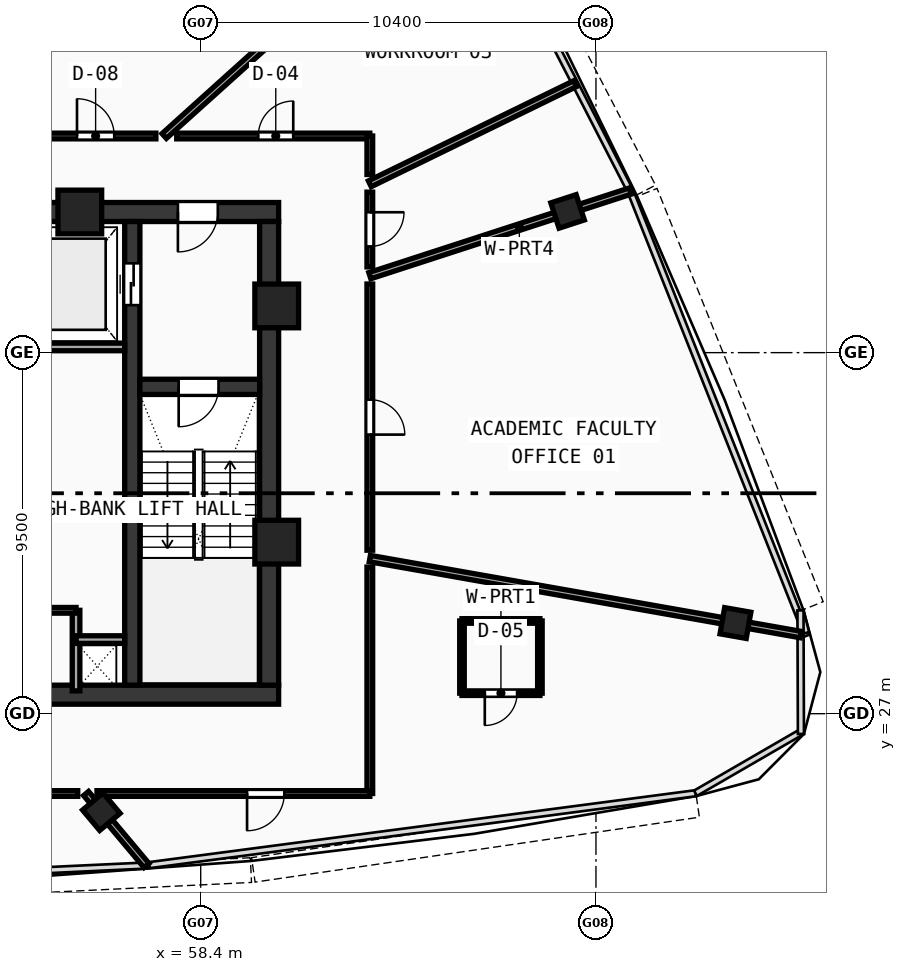
"""IFC4 building model, lengths in metres.
Left out: names, types, materials, properties, quantities, classifications, styles, units other than length and angle.
Written with IfcOpenShell. Run it as: python <this file> out.ifc"""

import sys

from ifc_helpers import new_model, si_unit, direction, frame, frame_2d, origin, origin_with_axes, origin_2d, place, context, subcontext, project, spatial, rectangle, hollow_rectangle, extrude, source, transform, mapped, element, fill, save


model = new_model("IFC4")
c1 = context("Model", 3, precision=1e-05, world=origin(), true_north=direction((0.0, 1.0)))
c2 = subcontext(c1, "Body", "Model", "MODEL_VIEW")
j1 = project(units=[si_unit("LENGTHUNIT", "METRE"), si_unit("PLANEANGLEUNIT", "RADIAN")], contexts=[c1])
p1 = place(None, origin())
s1 = spatial("IfcSite", under=j1, at=p1, CompositionType="ELEMENT")
p2 = place(p1, origin())
s2 = spatial("IfcBuilding", under=s1, at=p2, CompositionType="ELEMENT")
p3 = place(p2, frame((0.0, 0.0, 359.26)))
s3 = spatial("IfcBuildingStorey", under=s2, at=p3, CompositionType="ELEMENT", Elevation=359.26)
p4 = place(p3, frame((35.55, 27.5, 0.0), z_axis=(0.0, 0.0, 1.0), x_axis=(1.0, 0.0, 0.0)))
e1 = element("IfcWall", 1, at=p4, inside=s3, PredefinedType="SHEAR", context=c2, shape_type="SweptSolid", body=[
    extrude(rectangle(XDim=24.9, YDim=0.5, at=frame_2d((12.45, 0.0))), origin(), (0.0, 0.0, 1.0), 3.49),
])
p5 = place(p3, frame((49.2, 40.2, 0.0), z_axis=(0.0, 0.0, 1.0), x_axis=(1.0, 0.0, 0.0)))
e2 = element("IfcWall", 2, at=p5, inside=s3, PredefinedType="SHEAR", context=c2, shape_type="SweptSolid", body=[
    extrude(rectangle(XDim=11.25, YDim=0.5, at=frame_2d((5.625, 0.0))), origin(), (0.0, 0.0, 1.0), 3.49),
])
p6 = place(p5, frame((8.6, 0.0, 0.0)))
e3 = element("IfcOpeningElement", 3, at=p6, cuts=e2, PredefinedType="OPENING", context=c2, shape_type="SweptSolid", body=[
    extrude(rectangle(XDim=1.05, YDim=2.1, at=frame_2d((0.525, 1.05))), frame((0.0, 0.26, 0.0), z_axis=(0.0, -1.0, 0.0), x_axis=(1.0, 0.0, 0.0)), (0.0, 0.0, 1.0), 0.52),
])
p7 = place(p3, frame((60.2, 27.75, 0.0), z_axis=(0.0, 0.0, 1.0), x_axis=(0.0, 1.0, 0.0)))
e4 = element("IfcWall", 4, at=p7, inside=s3, PredefinedType="SHEAR", context=c2, shape_type="SweptSolid", body=[
    extrude(rectangle(XDim=12.2, YDim=0.5, at=frame_2d((6.1, 0.0))), origin(), (0.0, 0.0, 1.0), 3.49),
])
p8 = place(p3, frame((56.6, 27.75, 0.0), z_axis=(0.0, 0.0, 1.0), x_axis=(0.0, 1.0, 0.0)))
e5 = element("IfcWall", 5, at=p8, inside=s3, PredefinedType="SHEAR", context=c2, shape_type="SweptSolid", body=[
    extrude(rectangle(XDim=12.2, YDim=0.4, at=frame_2d((6.1, 0.0))), origin(), (0.0, 0.0, 1.0), 3.49),
])
p9 = place(p8, frame((10.0, 0.0, 0.0)))
e6 = element("IfcOpeningElement", 6, at=p9, cuts=e5, PredefinedType="OPENING", context=c2, shape_type="SweptSolid", body=[
    extrude(rectangle(XDim=1.1, YDim=2.1, at=frame_2d((0.55, 1.05))), frame((0.0, 0.21, 0.0), z_axis=(0.0, -1.0, 0.0), x_axis=(1.0, 0.0, 0.0)), (0.0, 0.0, 1.0), 0.42),
])
p10 = place(p3, frame((56.8, 35.6, 0.0), z_axis=(0.0, 0.0, 1.0), x_axis=(1.0, 0.0, 0.0)))
e7 = element("IfcWall", 7, at=p10, inside=s3, PredefinedType="SHEAR", context=c2, shape_type="SweptSolid", body=[
    extrude(rectangle(XDim=3.15, YDim=0.4, at=frame_2d((1.575, 0.0))), origin(), (0.0, 0.0, 1.0), 3.49),
])
p11 = place(p10, frame((1.02, 0.0, 0.0)))
e8 = element("IfcOpeningElement", 8, at=p11, cuts=e7, PredefinedType="OPENING", context=c2, shape_type="SweptSolid", body=[
    extrude(rectangle(XDim=1.05, YDim=2.1, at=frame_2d((0.525, 1.05))), frame((0.0, 0.21, 0.0), z_axis=(0.0, -1.0, 0.0), x_axis=(1.0, 0.0, 0.0)), (0.0, 0.0, 1.0), 0.42),
])
m1 = source(origin(), c2, "Body", "SweptSolid", [
    extrude(hollow_rectangle(XDim=1.15, YDim=1.15, WallThickness=0.048, at=origin_2d()), origin(), (0.0, 0.0, 1.0), 3.75),
])
for number, where, z_axis, x_axis in (
    (9, (60.4, 31.513, -0.26), (0.0, 0.0, 1.0), (1.0, 0.0, 0.0)),
    (10, (60.4, 37.729, -0.26), (0.0, 0.0, 1.0), (1.0, 0.0, 0.0)),
    (11, (55.219, 40.2, -0.26), (0.0, 0.0, 1.0), (1.0, 0.0, 0.0)),
):
    element("IfcColumn", number, at=place(p3, frame(where, z_axis=z_axis, x_axis=x_axis)), inside=s3, PredefinedType="COLUMN", context=c2, shape_type="MappedRepresentation", body=[
        mapped(m1, transform((0.0, 0.0, 0.0), scale=1.0)),
    ])
m2 = source(origin(), c2, "Body", "SweptSolid", [
    extrude(hollow_rectangle(XDim=0.7, YDim=0.7, WallThickness=0.026, at=origin_2d()), origin(), (0.0, 0.0, 1.0), 3.75),
])
for number, where, z_axis, x_axis in (
    (12, (55.785, 24.422, -0.26), (0.0, 0.0, 1.0), (0.766, 0.643, 0.0)),
    (13, (72.47, 29.385, -0.26), (0.0, 0.0, 1.0), (0.174, 0.985, 0.0)),
    (14, (68.053, 40.216, -0.26), (0.0, 0.0, 1.0), (-0.309, 0.951, 0.0)),
):
    element("IfcColumn", number, at=place(p3, frame(where, z_axis=z_axis, x_axis=x_axis)), inside=s3, PredefinedType="COLUMN", context=c2, shape_type="MappedRepresentation", body=[
        mapped(m2, transform((0.0, 0.0, 0.0), scale=1.0)),
    ])
p12 = place(p3, frame((53.68, 36.65, 0.0), z_axis=(0.0, 0.0, 1.0), x_axis=(1.0, 0.0, 0.0)))
e15 = element("IfcWall", 15, at=p12, inside=s3, PredefinedType="SOLIDWALL", context=c2, shape_type="SweptSolid", body=[
    extrude(rectangle(XDim=2.72, YDim=0.2, at=frame_2d((1.36, 0.0))), origin(), (0.0, 0.0, 1.0), 3.49),
])
p13 = place(p3, frame((55.12, 27.6, 0.0), z_axis=(0.0, 0.0, 1.0), x_axis=(0.0, 1.0, 0.0)))
e16 = element("IfcWall", 16, at=p13, inside=s3, PredefinedType="SOLIDWALL", context=c2, shape_type="SweptSolid", body=[
    extrude(rectangle(XDim=2.12, YDim=0.2, at=frame_2d((1.06, 0.0))), origin(), (0.0, 0.0, 1.0), 3.49),
])
p14 = place(p3, frame((55.12, 28.95, 0.0), z_axis=(0.0, 0.0, 1.0), x_axis=(1.0, 0.0, 0.0)))
e17 = element("IfcWall", 17, at=p14, inside=s3, PredefinedType="SOLIDWALL", context=c2, shape_type="SweptSolid", body=[
    extrude(rectangle(XDim=1.28, YDim=0.2, at=frame_2d((0.64, 0.0))), origin(), (0.0, 0.0, 1.0), 3.49),
])
p15 = place(p3, frame((51.05, 29.72, 0.0), z_axis=(0.0, 0.0, 1.0), x_axis=(1.0, 0.0, 0.0)))
e18 = element("IfcWall", 18, at=p15, inside=s3, PredefinedType="PARTITIONING", context=c2, shape_type="SweptSolid", body=[
    extrude(rectangle(XDim=4.07, YDim=0.15, at=frame_2d((2.035, 0.0))), origin(), (0.0, 0.0, 1.0), 3.49),
])
p16 = place(p15, frame((0.5, 0.0, 0.0)))
e19 = element("IfcOpeningElement", 19, at=p16, cuts=e18, PredefinedType="OPENING", context=c2, shape_type="SweptSolid", body=[
    extrude(rectangle(XDim=0.9, YDim=2.1, at=frame_2d((0.45, 1.05))), frame((0.0, 0.085, 0.0), z_axis=(0.0, -1.0, 0.0), x_axis=(1.0, 0.0, 0.0)), (0.0, 0.0, 1.0), 0.17),
])
p17 = place(p3, frame((62.85, 38.525, 0.0), z_axis=(0.0, 0.0, 1.0), x_axis=(0.951060950279, 0.309003347644, 0.0)))
e20 = element("IfcWall", 20, at=p17, inside=s3, PredefinedType="PARTITIONING", context=c2, shape_type="SweptSolid", body=[
    extrude(rectangle(XDim=7.207, YDim=0.17, at=frame_2d((3.604, 0.0))), origin(), (0.0, 0.0, 1.0), 2.89),
])
p18 = place(p3, frame((62.85, 40.943, 0.0), z_axis=(0.0, 0.0, 1.0), x_axis=(0.898803189206, 0.438352400557, 0.0)))
e21 = element("IfcWall", 21, at=p18, inside=s3, PredefinedType="PARTITIONING", context=c2, shape_type="SweptSolid", body=[
    extrude(rectangle(XDim=6.01, YDim=0.17, at=frame_2d((3.005, 0.0))), origin(), (0.0, 0.0, 1.0), 2.89),
])
p19 = place(p3, frame((57.44, 42.2, 0.0), z_axis=(0.0, 0.0, 1.0), x_axis=(0.743152066897, 0.66912256386, 0.0)))
e22 = element("IfcWall", 22, at=p19, inside=s3, PredefinedType="PARTITIONING", context=c2, shape_type="SweptSolid", body=[
    extrude(rectangle(XDim=10.596, YDim=0.17, at=frame_2d((5.298, 0.0))), origin(), (0.0, 0.0, 1.0), 2.89),
])
p20 = place(p3, frame((55.384, 24.9, 0.0), z_axis=(0.0, 0.0, 1.0), x_axis=(0.642821604445, -0.766015916844, 0.0)))
e23 = element("IfcWall", 23, at=p20, inside=s3, PredefinedType="PARTITIONING", context=c2, shape_type="SweptSolid", body=[
    extrude(rectangle(XDim=2.473, YDim=0.17, at=frame_2d((1.237, 0.0))), origin(), (0.0, 0.0, 1.0), 2.89),
])
p21 = place(p3, frame((62.85, 31.082, 0.0), z_axis=(0.0, 0.0, 1.0), x_axis=(0.984809380036, -0.173638950101, 0.0)))
e24 = element("IfcWall", 24, at=p21, inside=s3, PredefinedType="PARTITIONING", context=c2, shape_type="SweptSolid", body=[
    extrude(rectangle(XDim=11.512, YDim=0.17, at=frame_2d((5.756, 0.0))), origin(), (0.0, 0.0, 1.0), 2.89),
])
p22 = place(p3, frame((54.02, 42.2, 0.0), z_axis=(0.0, 0.0, 1.0), x_axis=(1.0, 0.0, 0.0)))
e25 = element("IfcWall", 25, at=p22, inside=s3, PredefinedType="PARTITIONING", context=c2, shape_type="SweptSolid", body=[
    extrude(rectangle(XDim=3.2, YDim=0.15, at=frame_2d((1.6, 0.0))), origin(), (0.0, 0.0, 1.0), 2.89),
])
p23 = place(p22, frame((1.125, 0.0, 0.0)))
e26 = element("IfcOpeningElement", 26, at=p23, cuts=e25, PredefinedType="OPENING", context=c2, shape_type="SweptSolid", body=[
    extrude(rectangle(XDim=0.98, YDim=2.12, at=frame_2d((0.49, 1.06))), frame((0.0, 0.085, 0.0), z_axis=(0.0, -1.0, 0.0), x_axis=(1.0, 0.0, 0.0)), (0.0, 0.0, 1.0), 0.17),
])
p24 = place(p3, frame((57.769, 42.2, 0.0), z_axis=(0.0, 0.0, 1.0), x_axis=(1.0, 0.0, 0.0)))
e27 = element("IfcWall", 27, at=p24, inside=s3, PredefinedType="PARTITIONING", context=c2, shape_type="SweptSolid", body=[
    extrude(rectangle(XDim=5.081, YDim=0.15, at=frame_2d((2.541, 0.0))), origin(), (0.0, 0.0, 1.0), 3.14),
])
p25 = place(p24, frame((2.146, 0.0, 0.0)))
e28 = element("IfcOpeningElement", 28, at=p25, cuts=e27, PredefinedType="OPENING", context=c2, shape_type="SweptSolid", body=[
    extrude(rectangle(XDim=0.92, YDim=2.1, at=frame_2d((0.46, 1.05))), frame((0.0, 0.085, 0.0), z_axis=(0.0, -1.0, 0.0), x_axis=(1.0, 0.0, 0.0)), (0.0, 0.0, 1.0), 0.17),
])
p26 = place(p3, frame((62.85, 42.2, 0.0), z_axis=(0.0, 0.0, 1.0), x_axis=(0.0, -1.0, 0.0)))
e29 = element("IfcWall", 29, at=p26, inside=s3, PredefinedType="PARTITIONING", context=c2, shape_type="SweptSolid", body=[
    extrude(rectangle(XDim=1.012, YDim=0.15, at=frame_2d((0.506, 0.0))), origin(), (0.0, 0.0, 1.0), 3.49),
])
p27 = place(p3, frame((62.85, 40.723, 0.0), z_axis=(0.0, 0.0, 1.0), x_axis=(0.0, -1.0, 0.0)))
e30 = element("IfcWall", 30, at=p27, inside=s3, PredefinedType="PARTITIONING", context=c2, shape_type="SweptSolid", body=[
    extrude(rectangle(XDim=1.967, YDim=0.15, at=frame_2d((0.983, 0.0))), origin(), (0.0, 0.0, 1.0), 3.14),
])
p28 = place(p27, frame((0.529, 0.0, 0.0)))
e31 = element("IfcOpeningElement", 31, at=p28, cuts=e30, PredefinedType="OPENING", context=c2, shape_type="SweptSolid", body=[
    extrude(rectangle(XDim=0.9, YDim=2.08, at=frame_2d((0.45, 1.04))), frame((0.0, 0.085, 0.0), z_axis=(0.0, -1.0, 0.0), x_axis=(1.0, 0.0, 0.0)), (0.0, 0.0, 1.0), 0.17),
])
p29 = place(p3, frame((62.85, 38.305, 0.0), z_axis=(0.0, 0.0, 1.0), x_axis=(0.0, -1.0, 0.0)))
e32 = element("IfcWall", 32, at=p29, inside=s3, PredefinedType="PARTITIONING", context=c2, shape_type="SweptSolid", body=[
    extrude(rectangle(XDim=7.004, YDim=0.15, at=frame_2d((3.502, 0.0))), origin(), (0.0, 0.0, 1.0), 3.49),
])
p30 = place(p29, frame((3.042, 0.0, 0.0)))
e33 = element("IfcOpeningElement", 33, at=p30, cuts=e32, PredefinedType="OPENING", context=c2, shape_type="SweptSolid", body=[
    extrude(rectangle(XDim=0.92, YDim=2.1, at=frame_2d((0.46, 1.05))), frame((0.0, 0.085, 0.0), z_axis=(0.0, -1.0, 0.0), x_axis=(1.0, 0.0, 0.0)), (0.0, 0.0, 1.0), 0.17),
])
p31 = place(p3, frame((62.85, 30.858, 0.0), z_axis=(0.0, 0.0, 1.0), x_axis=(0.0, -1.0, 0.0)))
e34 = element("IfcWall", 34, at=p31, inside=s3, PredefinedType="PARTITIONING", context=c2, shape_type="SweptSolid", body=[
    extrude(rectangle(XDim=5.958, YDim=0.15, at=frame_2d((2.979, 0.0))), origin(), (0.0, 0.0, 1.0), 2.89),
])
p32 = place(p3, frame((62.85, 24.9, 0.0), z_axis=(0.0, 0.0, 1.0), x_axis=(-1.0, 0.0, 0.0)))
e35 = element("IfcWall", 35, at=p32, inside=s3, PredefinedType="PARTITIONING", context=c2, shape_type="SweptSolid", body=[
    extrude(rectangle(XDim=7.179, YDim=0.15, at=frame_2d((3.589, 0.0))), origin(), (0.0, 0.0, 1.0), 2.89),
])
p33 = place(p32, frame((2.25, 0.0, 0.0)))
e36 = element("IfcOpeningElement", 36, at=p33, cuts=e35, PredefinedType="OPENING", context=c2, shape_type="SweptSolid", body=[
    extrude(rectangle(XDim=0.98, YDim=2.12, at=frame_2d((0.49, 1.06))), frame((0.0, 0.085, 0.0), z_axis=(0.0, -1.0, 0.0), x_axis=(1.0, 0.0, 0.0)), (0.0, 0.0, 1.0), 0.17),
])
p34 = place(p3, frame((55.164, 24.9, 0.0), z_axis=(0.0, 0.0, 1.0), x_axis=(-1.0, 0.0, 0.0)))
e37 = element("IfcWall", 37, at=p34, inside=s3, PredefinedType="PARTITIONING", context=c2, shape_type="SweptSolid", body=[
    extrude(rectangle(XDim=4.579, YDim=0.15, at=frame_2d((2.289, 0.0))), origin(), (0.0, 0.0, 1.0), 3.49),
])
p35 = place(p34, frame((1.55, 0.0, 0.0)))
e38 = element("IfcOpeningElement", 38, at=p35, cuts=e37, PredefinedType="OPENING", context=c2, shape_type="SweptSolid", body=[
    extrude(rectangle(XDim=0.98, YDim=2.12, at=frame_2d((0.49, 1.06))), frame((0.0, 0.085, 0.0), z_axis=(0.0, -1.0, 0.0), x_axis=(1.0, 0.0, 0.0)), (0.0, 0.0, 1.0), 0.17),
])
p36 = place(p3, frame((65.275, 27.54, 0.0), z_axis=(0.0, 0.0, 1.0), x_axis=(1.0, 0.0, 0.0)))
e39 = element("IfcWall", 39, at=p36, inside=s3, PredefinedType="PARTITIONING", context=c2, shape_type="SweptSolid", body=[
    extrude(rectangle(XDim=2.05, YDim=0.12, at=frame_2d((1.025, 0.0))), origin(), (0.0, 0.0, 1.0), 2.89),
])
p37 = place(p36, frame((0.6, 0.0, 0.0)))
e40 = element("IfcOpeningElement", 40, at=p37, cuts=e39, PredefinedType="OPENING", context=c2, shape_type="SweptSolid", body=[
    extrude(rectangle(XDim=0.85, YDim=2.1, at=frame_2d((0.425, 1.05))), frame((0.0, 0.07, 0.0), z_axis=(0.0, -1.0, 0.0), x_axis=(1.0, 0.0, 0.0)), (0.0, 0.0, 1.0), 0.14),
])
p38 = place(p3, frame((67.325, 27.54, 0.0), z_axis=(0.0, 0.0, 1.0), x_axis=(0.0, 1.0, 0.0)))
e41 = element("IfcWall", 41, at=p38, inside=s3, PredefinedType="PARTITIONING", context=c2, shape_type="SweptSolid", body=[
    extrude(rectangle(XDim=1.9, YDim=0.12, at=frame_2d((0.95, 0.0))), origin(), (0.0, 0.0, 1.0), 2.89),
])
p39 = place(p3, frame((67.325, 29.44, 0.0), z_axis=(0.0, 0.0, 1.0), x_axis=(-1.0, 0.0, 0.0)))
e42 = element("IfcWall", 42, at=p39, inside=s3, PredefinedType="PARTITIONING", context=c2, shape_type="SweptSolid", body=[
    extrude(rectangle(XDim=2.05, YDim=0.12, at=frame_2d((1.025, 0.0))), origin(), (0.0, 0.0, 1.0), 3.49),
])
p40 = place(p3, frame((65.275, 29.44, 0.0), z_axis=(0.0, 0.0, 1.0), x_axis=(0.0, -1.0, 0.0)))
e43 = element("IfcWall", 43, at=p40, inside=s3, PredefinedType="PARTITIONING", context=c2, shape_type="SweptSolid", body=[
    extrude(rectangle(XDim=1.9, YDim=0.12, at=frame_2d((0.95, 0.0))), origin(), (0.0, 0.0, 1.0), 3.49),
])
m3 = source(origin(), c2, "Body", "SweptSolid", [
    extrude(rectangle(XDim=1.05, YDim=2.1, at=frame_2d((0.525, 1.05))), frame((0.0, 0.025, 0.0), z_axis=(0.0, -1.0, 0.0), x_axis=(1.0, 0.0, 0.0)), (0.0, 0.0, 1.0), 0.05),
])
p41 = place(p11, frame((1.05, 0.0, 0.0), z_axis=(0.0, 0.0, 1.0), x_axis=(-1.0, 0.0, 0.0)))
e44 = element("IfcDoor", 44, at=p41, inside=s3, OperationType="SINGLE_SWING_RIGHT", PredefinedType="DOOR", context=c2, shape_type="MappedRepresentation", body=[
    mapped(m3, transform((0.0, 0.0, 0.0), scale=1.0)),
])
fill(e8, e44)
p42 = place(p6, frame((1.05, 0.0, 0.0), z_axis=(0.0, 0.0, 1.0), x_axis=(-1.0, 0.0, 0.0)))
e45 = element("IfcDoor", 45, at=p42, inside=s3, OperationType="SINGLE_SWING_RIGHT", PredefinedType="DOOR", context=c2, shape_type="MappedRepresentation", body=[
    mapped(m3, transform((0.0, 0.0, 0.0), scale=1.0)),
])
fill(e3, e45)
m4 = source(origin(), c2, "Body", "SweptSolid", [
    extrude(rectangle(XDim=1.1, YDim=2.1, at=frame_2d((0.55, 1.05))), frame((0.0, 0.025, 0.0), z_axis=(0.0, -1.0, 0.0), x_axis=(1.0, 0.0, 0.0)), (0.0, 0.0, 1.0), 0.05),
])
p43 = place(p9, origin_with_axes())
e46 = element("IfcDoor", 46, at=p43, inside=s3, OperationType="DOUBLE_DOOR_SLIDING", PredefinedType="DOOR", context=c2, shape_type="MappedRepresentation", body=[
    mapped(m4, transform((0.0, 0.0, 0.0), scale=1.0)),
])
fill(e6, e46)
m5 = source(origin(), c2, "Body", "SweptSolid", [
    extrude(rectangle(XDim=0.92, YDim=2.1, at=frame_2d((0.46, 1.05))), frame((0.0, 0.025, 0.0), z_axis=(0.0, -1.0, 0.0), x_axis=(1.0, 0.0, 0.0)), (0.0, 0.0, 1.0), 0.05),
])
p44 = place(p30, origin_with_axes())
e47 = element("IfcDoor", 47, at=p44, inside=s3, OperationType="SINGLE_SWING_RIGHT", PredefinedType="DOOR", context=c2, shape_type="MappedRepresentation", body=[
    mapped(m5, transform((0.0, 0.0, 0.0), scale=1.0)),
])
fill(e33, e47)
m6 = source(origin(), c2, "Body", "SweptSolid", [
    extrude(rectangle(XDim=0.9, YDim=2.08, at=frame_2d((0.45, 1.04))), frame((0.0, 0.025, 0.0), z_axis=(0.0, -1.0, 0.0), x_axis=(1.0, 0.0, 0.0)), (0.0, 0.0, 1.0), 0.05),
])
p45 = place(p28, origin_with_axes())
e48 = element("IfcDoor", 48, at=p45, inside=s3, OperationType="SINGLE_SWING_LEFT", PredefinedType="DOOR", context=c2, shape_type="MappedRepresentation", body=[
    mapped(m6, transform((0.0, 0.0, 0.0), scale=1.0)),
])
fill(e31, e48)
p46 = place(p25, origin_with_axes())
e49 = element("IfcDoor", 49, at=p46, inside=s3, OperationType="SINGLE_SWING_RIGHT", PredefinedType="DOOR", context=c2, shape_type="MappedRepresentation", body=[
    mapped(m5, transform((0.0, 0.0, 0.0), scale=1.0)),
])
fill(e28, e49)
m7 = source(origin(), c2, "Body", "SweptSolid", [
    extrude(rectangle(XDim=0.98, YDim=2.12, at=frame_2d((0.49, 1.06))), frame((0.0, 0.025, 0.0), z_axis=(0.0, -1.0, 0.0), x_axis=(1.0, 0.0, 0.0)), (0.0, 0.0, 1.0), 0.05),
])
p47 = place(p23, origin_with_axes())
e50 = element("IfcDoor", 50, at=p47, inside=s3, OperationType="SINGLE_SWING_LEFT", PredefinedType="DOOR", context=c2, shape_type="MappedRepresentation", body=[
    mapped(m7, transform((0.0, 0.0, 0.0), scale=1.0)),
])
fill(e26, e50)
p48 = place(p33, origin_with_axes())
e51 = element("IfcDoor", 51, at=p48, inside=s3, OperationType="SINGLE_SWING_RIGHT", PredefinedType="DOOR", context=c2, shape_type="MappedRepresentation", body=[
    mapped(m7, transform((0.0, 0.0, 0.0), scale=1.0)),
])
fill(e36, e51)
m8 = source(origin(), c2, "Body", "SweptSolid", [
    extrude(rectangle(XDim=0.85, YDim=2.1, at=frame_2d((0.425, 1.05))), frame((0.0, 0.025, 0.0), z_axis=(0.0, -1.0, 0.0), x_axis=(1.0, 0.0, 0.0)), (0.0, 0.0, 1.0), 0.05),
])
p49 = place(p37, frame((0.85, 0.0, 0.0), z_axis=(0.0, 0.0, 1.0), x_axis=(-1.0, 0.0, 0.0)))
e52 = element("IfcDoor", 52, at=p49, inside=s3, OperationType="SINGLE_SWING_RIGHT", PredefinedType="DOOR", context=c2, shape_type="MappedRepresentation", body=[
    mapped(m8, transform((0.0, 0.0, 0.0), scale=1.0)),
])
fill(e40, e52)
save(model, sys.argv[1])
